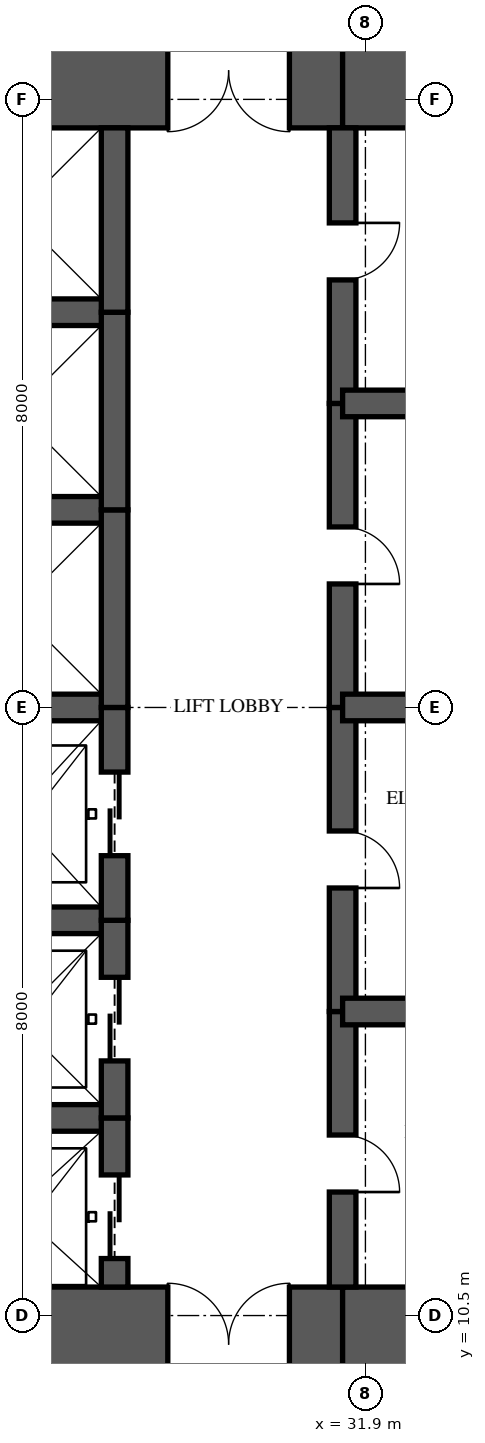
"""IFC4 building model, lengths in metres.
Left out: names, types, materials, properties, quantities, classifications, styles, units other than length and angle.
Written with IfcOpenShell. Run it as: python <this file> out.ifc"""

import sys

from ifc_helpers import new_model, si_unit, direction, frame, frame_2d, origin, place, context, subcontext, project, spatial, rectangle, extrude, element, fill, save


model = new_model("IFC4")
c1 = context("Model", 3, precision=1e-05, world=origin(), true_north=direction((0.0, 1.0)))
c2 = subcontext(c1, "Body", "Model", "MODEL_VIEW")
j1 = project(units=[si_unit("LENGTHUNIT", "METRE"), si_unit("PLANEANGLEUNIT", "RADIAN")], contexts=[c1])
p1 = place(None, origin())
s1 = spatial("IfcSite", under=j1, at=p1, CompositionType="ELEMENT")
p2 = place(p1, origin())
s2 = spatial("IfcBuilding", under=s1, at=p2, CompositionType="ELEMENT")
p3 = place(p2, frame((0.0, 0.0, 128.3)))
s3 = spatial("IfcBuildingStorey", under=s2, at=p3, CompositionType="ELEMENT", Elevation=128.3)
p4 = place(p3, frame((26.0, 10.125, 0.0), z_axis=(0.0, 0.0, 1.0), x_axis=(1.0, 0.0, 0.0)))
e1 = element("IfcWall", 1, at=p4, inside=s3, PredefinedType="SHEAR", context=c2, shape_type="SweptSolid", body=[
    extrude(rectangle(XDim=5.6, YDim=1.5, at=frame_2d((2.8, 0.0))), origin(), (0.0, 0.0, 1.0), 3.35),
])
p5 = place(p4, frame((3.3, 0.0, 0.0)))
e2 = element("IfcOpeningElement", 2, at=p5, cuts=e1, PredefinedType="OPENING", context=c2, shape_type="SweptSolid", body=[
    extrude(rectangle(XDim=1.6, YDim=2.1, at=frame_2d((0.8, 1.05))), frame((0.0, 0.76, 0.0), z_axis=(0.0, -1.0, 0.0), x_axis=(1.0, 0.0, 0.0)), (0.0, 0.0, 1.0), 1.52),
])
for number, where, z_axis, x_axis in (
    (3, (31.6, 10.125, 0.0), (0.0, 0.0, 1.0), (1.0, 0.0, 0.0)),
    (4, (35.9, 26.875, 0.0), (0.0, 0.0, 1.0), (-1.0, 0.0, 0.0)),
):
    element("IfcWall", number, at=place(p3, frame(where, z_axis=z_axis, x_axis=x_axis)), inside=s3, PredefinedType="SHEAR", context=c2, shape_type="SweptSolid", body=[
        extrude(rectangle(XDim=4.3, YDim=1.5, at=frame_2d((2.15, 0.0))), origin(), (0.0, 0.0, 1.0), 3.35),
    ])
p6 = place(p3, frame((31.6, 26.875, 0.0), z_axis=(0.0, 0.0, 1.0), x_axis=(-1.0, 0.0, 0.0)))
e5 = element("IfcWall", 5, at=p6, inside=s3, PredefinedType="SHEAR", context=c2, shape_type="SweptSolid", body=[
    extrude(rectangle(XDim=5.6, YDim=1.5, at=frame_2d((2.8, 0.0))), origin(), (0.0, 0.0, 1.0), 3.35),
])
p7 = place(p6, frame((0.7, 0.0, 0.0)))
e6 = element("IfcOpeningElement", 6, at=p7, cuts=e5, PredefinedType="OPENING", context=c2, shape_type="SweptSolid", body=[
    extrude(rectangle(XDim=1.6, YDim=2.1, at=frame_2d((0.8, 1.05))), frame((0.0, 0.76, 0.0), z_axis=(0.0, -1.0, 0.0), x_axis=(1.0, 0.0, 0.0)), (0.0, 0.0, 1.0), 1.52),
])
p8 = place(p3, frame((28.6, 10.875, 0.0), z_axis=(0.0, 0.0, 1.0), x_axis=(0.0, 1.0, 0.0)))
e7 = element("IfcWall", 7, at=p8, inside=s3, PredefinedType="SHEAR", context=c2, shape_type="SweptSolid", body=[
    extrude(rectangle(XDim=2.225, YDim=0.35, at=frame_2d((1.113, 0.0))), origin(), (0.0, 0.0, 1.0), 3.35),
])
p9 = place(p8, frame((0.375, 0.0, 0.0)))
e8 = element("IfcOpeningElement", 8, at=p9, cuts=e7, PredefinedType="OPENING", context=c2, shape_type="SweptSolid", body=[
    extrude(rectangle(XDim=1.1, YDim=2.1, at=frame_2d((0.55, 1.05))), frame((0.0, 0.185, 0.0), z_axis=(0.0, -1.0, 0.0), x_axis=(1.0, 0.0, 0.0)), (0.0, 0.0, 1.0), 0.37),
])
p10 = place(p3, frame((28.6, 13.1, 0.0), z_axis=(0.0, 0.0, 1.0), x_axis=(0.0, 1.0, 0.0)))
e9 = element("IfcWall", 9, at=p10, inside=s3, PredefinedType="SHEAR", context=c2, shape_type="SweptSolid", body=[
    extrude(rectangle(XDim=2.6, YDim=0.35, at=frame_2d((1.3, 0.0))), origin(), (0.0, 0.0, 1.0), 3.35),
])
p11 = place(p10, frame((0.75, 0.0, 0.0)))
e10 = element("IfcOpeningElement", 10, at=p11, cuts=e9, PredefinedType="OPENING", context=c2, shape_type="SweptSolid", body=[
    extrude(rectangle(XDim=1.1, YDim=2.1, at=frame_2d((0.55, 1.05))), frame((0.0, 0.185, 0.0), z_axis=(0.0, -1.0, 0.0), x_axis=(1.0, 0.0, 0.0)), (0.0, 0.0, 1.0), 0.37),
])
p12 = place(p3, frame((28.6, 15.7, 0.0), z_axis=(0.0, 0.0, 1.0), x_axis=(0.0, 1.0, 0.0)))
e11 = element("IfcWall", 11, at=p12, inside=s3, PredefinedType="SHEAR", context=c2, shape_type="SweptSolid", body=[
    extrude(rectangle(XDim=2.8, YDim=0.35, at=frame_2d((1.4, 0.0))), origin(), (0.0, 0.0, 1.0), 3.35),
])
p13 = place(p12, frame((0.85, 0.0, 0.0)))
e12 = element("IfcOpeningElement", 12, at=p13, cuts=e11, PredefinedType="OPENING", context=c2, shape_type="SweptSolid", body=[
    extrude(rectangle(XDim=1.1, YDim=2.1, at=frame_2d((0.55, 1.05))), frame((0.0, 0.185, 0.0), z_axis=(0.0, -1.0, 0.0), x_axis=(1.0, 0.0, 0.0)), (0.0, 0.0, 1.0), 0.37),
])
p14 = place(p3, frame((28.6, 18.5, 0.0), z_axis=(0.0, 0.0, 1.0), x_axis=(0.0, 1.0, 0.0)))
e13 = element("IfcWall", 13, at=p14, inside=s3, PredefinedType="SHEAR", context=c2, shape_type="SweptSolid", body=[
    extrude(rectangle(XDim=2.6, YDim=0.35, at=frame_2d((1.3, 0.0))), origin(), (0.0, 0.0, 1.0), 3.35),
])
p15 = place(p3, frame((28.6, 21.1, 0.0), z_axis=(0.0, 0.0, 1.0), x_axis=(0.0, 1.0, 0.0)))
e14 = element("IfcWall", 14, at=p15, inside=s3, PredefinedType="SHEAR", context=c2, shape_type="SweptSolid", body=[
    extrude(rectangle(XDim=2.6, YDim=0.35, at=frame_2d((1.3, 0.0))), origin(), (0.0, 0.0, 1.0), 3.35),
])
p16 = place(p3, frame((28.6, 23.7, 0.0), z_axis=(0.0, 0.0, 1.0), x_axis=(0.0, 1.0, 0.0)))
e15 = element("IfcWall", 15, at=p16, inside=s3, PredefinedType="SHEAR", context=c2, shape_type="SweptSolid", body=[
    extrude(rectangle(XDim=2.425, YDim=0.35, at=frame_2d((1.212, 0.0))), origin(), (0.0, 0.0, 1.0), 3.35),
])
p17 = place(p3, frame((31.6, 10.875, 0.0), z_axis=(0.0, 0.0, 1.0), x_axis=(0.0, 1.0, 0.0)))
e16 = element("IfcWall", 16, at=p17, inside=s3, PredefinedType="SHEAR", context=c2, shape_type="SweptSolid", body=[
    extrude(rectangle(XDim=3.625, YDim=0.35, at=frame_2d((1.812, 0.0))), origin(), (0.0, 0.0, 1.0), 3.35),
])
p18 = place(p17, frame((1.25, 0.0, 0.0)))
e17 = element("IfcOpeningElement", 17, at=p18, cuts=e16, PredefinedType="OPENING", context=c2, shape_type="SweptSolid", body=[
    extrude(rectangle(XDim=0.75, YDim=2.1, at=frame_2d((0.375, 1.05))), frame((0.0, 0.185, 0.0), z_axis=(0.0, -1.0, 0.0), x_axis=(1.0, 0.0, 0.0)), (0.0, 0.0, 1.0), 0.37),
])
p19 = place(p3, frame((31.6, 14.5, 0.0), z_axis=(0.0, 0.0, 1.0), x_axis=(0.0, 1.0, 0.0)))
e18 = element("IfcWall", 18, at=p19, inside=s3, PredefinedType="SHEAR", context=c2, shape_type="SweptSolid", body=[
    extrude(rectangle(XDim=4.0, YDim=0.35, at=frame_2d((2.0, 0.0))), origin(), (0.0, 0.0, 1.0), 3.35),
])
p20 = place(p19, frame((1.625, 0.0, 0.0)))
e19 = element("IfcOpeningElement", 19, at=p20, cuts=e18, PredefinedType="OPENING", context=c2, shape_type="SweptSolid", body=[
    extrude(rectangle(XDim=0.75, YDim=2.1, at=frame_2d((0.375, 1.05))), frame((0.0, 0.185, 0.0), z_axis=(0.0, -1.0, 0.0), x_axis=(1.0, 0.0, 0.0)), (0.0, 0.0, 1.0), 0.37),
])
p21 = place(p3, frame((31.6, 18.5, 0.0), z_axis=(0.0, 0.0, 1.0), x_axis=(0.0, 1.0, 0.0)))
e20 = element("IfcWall", 20, at=p21, inside=s3, PredefinedType="SHEAR", context=c2, shape_type="SweptSolid", body=[
    extrude(rectangle(XDim=4.0, YDim=0.35, at=frame_2d((2.0, 0.0))), origin(), (0.0, 0.0, 1.0), 3.35),
])
p22 = place(p21, frame((1.625, 0.0, 0.0)))
e21 = element("IfcOpeningElement", 21, at=p22, cuts=e20, PredefinedType="OPENING", context=c2, shape_type="SweptSolid", body=[
    extrude(rectangle(XDim=0.75, YDim=2.1, at=frame_2d((0.375, 1.05))), frame((0.0, 0.185, 0.0), z_axis=(0.0, -1.0, 0.0), x_axis=(1.0, 0.0, 0.0)), (0.0, 0.0, 1.0), 0.37),
])
p23 = place(p3, frame((31.6, 22.5, 0.0), z_axis=(0.0, 0.0, 1.0), x_axis=(0.0, 1.0, 0.0)))
e22 = element("IfcWall", 22, at=p23, inside=s3, PredefinedType="SHEAR", context=c2, shape_type="SweptSolid", body=[
    extrude(rectangle(XDim=3.625, YDim=0.35, at=frame_2d((1.812, 0.0))), origin(), (0.0, 0.0, 1.0), 3.35),
])
p24 = place(p23, frame((1.625, 0.0, 0.0)))
e23 = element("IfcOpeningElement", 23, at=p24, cuts=e22, PredefinedType="OPENING", context=c2, shape_type="SweptSolid", body=[
    extrude(rectangle(XDim=0.75, YDim=2.1, at=frame_2d((0.375, 1.05))), frame((0.0, 0.185, 0.0), z_axis=(0.0, -1.0, 0.0), x_axis=(1.0, 0.0, 0.0)), (0.0, 0.0, 1.0), 0.37),
])
for number, where, z_axis, x_axis in (
    (24, (26.0, 13.1, 0.0), (0.0, 0.0, 1.0), (1.0, 0.0, 0.0)),
    (25, (26.0, 15.7, 0.0), (0.0, 0.0, 1.0), (1.0, 0.0, 0.0)),
    (26, (26.0, 18.5, 0.0), (0.0, 0.0, 1.0), (1.0, 0.0, 0.0)),
    (27, (26.0, 21.1, 0.0), (0.0, 0.0, 1.0), (1.0, 0.0, 0.0)),
    (28, (26.0, 23.7, 0.0), (0.0, 0.0, 1.0), (1.0, 0.0, 0.0)),
):
    element("IfcWall", number, at=place(p3, frame(where, z_axis=z_axis, x_axis=x_axis)), inside=s3, PredefinedType="SHEAR", context=c2, shape_type="SweptSolid", body=[
        extrude(rectangle(XDim=2.6, YDim=0.35, at=frame_2d((1.3, 0.0))), origin(), (0.0, 0.0, 1.0), 3.35),
    ])
for number, where, z_axis, x_axis in (
    (29, (31.6, 14.5, 0.0), (0.0, 0.0, 1.0), (1.0, 0.0, 0.0)),
    (30, (31.6, 18.5, 0.0), (0.0, 0.0, 1.0), (1.0, 0.0, 0.0)),
    (31, (31.6, 22.5, 0.0), (0.0, 0.0, 1.0), (1.0, 0.0, 0.0)),
):
    element("IfcWall", number, at=place(p3, frame(where, z_axis=z_axis, x_axis=x_axis)), inside=s3, PredefinedType="SHEAR", context=c2, shape_type="SweptSolid", body=[
        extrude(rectangle(XDim=4.3, YDim=0.35, at=frame_2d((2.15, 0.0))), origin(), (0.0, 0.0, 1.0), 3.35),
    ])
p25 = place(p9, origin())
e32 = element("IfcDoor", 32, at=p25, inside=s3, OperationType="SLIDING_TO_LEFT", PredefinedType="DOOR", context=c2, shape_type="SweptSolid", body=[
    extrude(rectangle(XDim=1.1, YDim=2.1, at=frame_2d((0.55, 1.05))), frame((0.0, 0.025, 0.0), z_axis=(0.0, -1.0, 0.0), x_axis=(1.0, 0.0, 0.0)), (0.0, 0.0, 1.0), 0.05),
])
fill(e8, e32)
p26 = place(p11, origin())
e33 = element("IfcDoor", 33, at=p26, inside=s3, OperationType="SLIDING_TO_LEFT", PredefinedType="DOOR", context=c2, shape_type="SweptSolid", body=[
    extrude(rectangle(XDim=1.1, YDim=2.1, at=frame_2d((0.55, 1.05))), frame((0.0, 0.025, 0.0), z_axis=(0.0, -1.0, 0.0), x_axis=(1.0, 0.0, 0.0)), (0.0, 0.0, 1.0), 0.05),
])
fill(e10, e33)
p27 = place(p13, origin())
e34 = element("IfcDoor", 34, at=p27, inside=s3, OperationType="SLIDING_TO_LEFT", PredefinedType="DOOR", context=c2, shape_type="SweptSolid", body=[
    extrude(rectangle(XDim=1.1, YDim=2.1, at=frame_2d((0.55, 1.05))), frame((0.0, 0.025, 0.0), z_axis=(0.0, -1.0, 0.0), x_axis=(1.0, 0.0, 0.0)), (0.0, 0.0, 1.0), 0.05),
])
fill(e12, e34)
p28 = place(p5, origin())
e35 = element("IfcDoor", 35, at=p28, inside=s3, OperationType="DOUBLE_DOOR_SINGLE_SWING", PredefinedType="DOOR", context=c2, shape_type="SweptSolid", body=[
    extrude(rectangle(XDim=1.6, YDim=2.1, at=frame_2d((0.8, 1.05))), frame((0.0, 0.025, 0.0), z_axis=(0.0, -1.0, 0.0), x_axis=(1.0, 0.0, 0.0)), (0.0, 0.0, 1.0), 0.05),
])
fill(e2, e35)
p29 = place(p7, origin())
e36 = element("IfcDoor", 36, at=p29, inside=s3, OperationType="DOUBLE_DOOR_SINGLE_SWING", PredefinedType="DOOR", context=c2, shape_type="SweptSolid", body=[
    extrude(rectangle(XDim=1.6, YDim=2.1, at=frame_2d((0.8, 1.05))), frame((0.0, 0.025, 0.0), z_axis=(0.0, -1.0, 0.0), x_axis=(1.0, 0.0, 0.0)), (0.0, 0.0, 1.0), 0.05),
])
fill(e6, e36)
p30 = place(p18, frame((0.75, 0.0, 0.0), z_axis=(0.0, 0.0, 1.0), x_axis=(-1.0, 0.0, 0.0)))
e37 = element("IfcDoor", 37, at=p30, inside=s3, OperationType="SINGLE_SWING_RIGHT", PredefinedType="DOOR", context=c2, shape_type="SweptSolid", body=[
    extrude(rectangle(XDim=0.75, YDim=2.1, at=frame_2d((0.375, 1.05))), frame((0.0, 0.025, 0.0), z_axis=(0.0, -1.0, 0.0), x_axis=(1.0, 0.0, 0.0)), (0.0, 0.0, 1.0), 0.05),
])
fill(e17, e37)
p31 = place(p20, frame((0.75, 0.0, 0.0), z_axis=(0.0, 0.0, 1.0), x_axis=(-1.0, 0.0, 0.0)))
e38 = element("IfcDoor", 38, at=p31, inside=s3, OperationType="SINGLE_SWING_RIGHT", PredefinedType="DOOR", context=c2, shape_type="SweptSolid", body=[
    extrude(rectangle(XDim=0.75, YDim=2.1, at=frame_2d((0.375, 1.05))), frame((0.0, 0.025, 0.0), z_axis=(0.0, -1.0, 0.0), x_axis=(1.0, 0.0, 0.0)), (0.0, 0.0, 1.0), 0.05),
])
fill(e19, e38)
p32 = place(p22, frame((0.75, 0.0, 0.0), z_axis=(0.0, 0.0, 1.0), x_axis=(-1.0, 0.0, 0.0)))
e39 = element("IfcDoor", 39, at=p32, inside=s3, OperationType="SINGLE_SWING_RIGHT", PredefinedType="DOOR", context=c2, shape_type="SweptSolid", body=[
    extrude(rectangle(XDim=0.75, YDim=2.1, at=frame_2d((0.375, 1.05))), frame((0.0, 0.025, 0.0), z_axis=(0.0, -1.0, 0.0), x_axis=(1.0, 0.0, 0.0)), (0.0, 0.0, 1.0), 0.05),
])
fill(e21, e39)
p33 = place(p24, frame((0.75, 0.0, 0.0), z_axis=(0.0, 0.0, 1.0), x_axis=(-1.0, 0.0, 0.0)))
e40 = element("IfcDoor", 40, at=p33, inside=s3, OperationType="SINGLE_SWING_LEFT", PredefinedType="DOOR", context=c2, shape_type="SweptSolid", body=[
    extrude(rectangle(XDim=0.75, YDim=2.1, at=frame_2d((0.375, 1.05))), frame((0.0, 0.025, 0.0), z_axis=(0.0, -1.0, 0.0), x_axis=(1.0, 0.0, 0.0)), (0.0, 0.0, 1.0), 0.05),
])
fill(e23, e40)
save(model, sys.argv[1])
